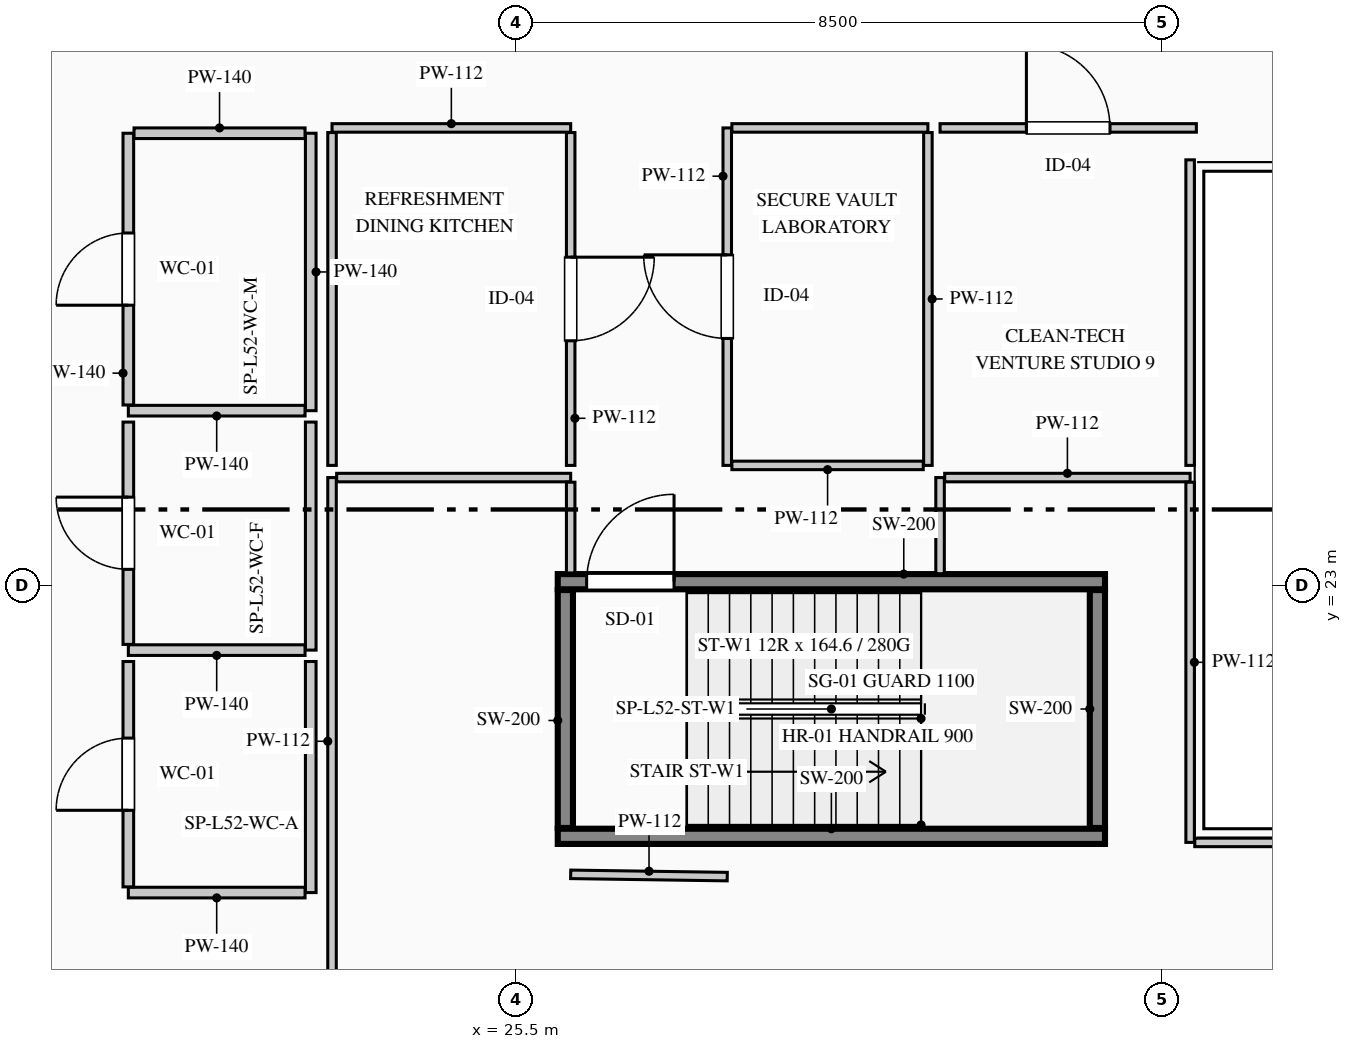
"""IFC4 building model, lengths in metres.
Left out: names, types, materials, properties, quantities, classifications, styles, units other than length and angle.
Written with IfcOpenShell. Run it as: python <this file> out.ifc"""

import sys

from ifc_helpers import new_model, si_unit, direction, frame, frame_2d, origin, place, context, subcontext, project, spatial, rectangle, extrude, element, fill, save


model = new_model("IFC4")
c1 = context("Model", 3, precision=1e-05, world=origin(), true_north=direction((0.0, 1.0)))
c2 = subcontext(c1, "Body", "Model", "MODEL_VIEW")
j1 = project(units=[si_unit("LENGTHUNIT", "METRE"), si_unit("PLANEANGLEUNIT", "RADIAN")], contexts=[c1])
p1 = place(None, origin())
s1 = spatial("IfcSite", under=j1, at=p1, CompositionType="ELEMENT")
p2 = place(p1, origin())
s2 = spatial("IfcBuilding", under=s1, at=p2, CompositionType="ELEMENT")
p3 = place(p2, frame((0.0, 0.0, 219.3)))
s3 = spatial("IfcBuildingStorey", under=s2, at=p3, CompositionType="ELEMENT", Elevation=219.3)
p4 = place(p3, frame((26.05, 19.7, 0.0), z_axis=(0.0, 0.0, 1.0), x_axis=(1.0, 0.0, 0.0)))
e1 = element("IfcWall", 1, at=p4, inside=s3, PredefinedType="SHEAR", context=c2, shape_type="SweptSolid", body=[
    extrude(rectangle(XDim=7.2, YDim=0.2, at=frame_2d((3.6, 0.0))), origin(), (0.0, 0.0, 1.0), 3.95),
])
p5 = place(p3, frame((26.05, 23.05, 0.0), z_axis=(0.0, 0.0, 1.0), x_axis=(1.0, 0.0, 0.0)))
e2 = element("IfcWall", 2, at=p5, inside=s3, PredefinedType="SHEAR", context=c2, shape_type="SweptSolid", body=[
    extrude(rectangle(XDim=7.2, YDim=0.2, at=frame_2d((3.6, 0.0))), origin(), (0.0, 0.0, 1.0), 3.95),
])
p6 = place(p5, frame((0.38, 0.0, 0.0)))
e3 = element("IfcOpeningElement", 3, at=p6, cuts=e2, PredefinedType="OPENING", context=c2, shape_type="SweptSolid", body=[
    extrude(rectangle(XDim=1.15, YDim=2.2, at=frame_2d((0.575, 1.1))), frame((0.0, 0.11, 0.0), z_axis=(0.0, -1.0, 0.0), x_axis=(1.0, 0.0, 0.0)), (0.0, 0.0, 1.0), 0.22),
])
for number, where, z_axis, x_axis in (
    (4, (26.15, 19.81, 0.0), (0.0, 0.0, 1.0), (0.0, 1.0, 0.0)),
    (5, (33.15, 19.81, 0.0), (0.0, 0.0, 1.0), (0.0, 1.0, 0.0)),
):
    element("IfcWall", number, at=place(p3, frame(where, z_axis=z_axis, x_axis=x_axis)), inside=s3, PredefinedType="SHEAR", context=c2, shape_type="SweptSolid", body=[
        extrude(rectangle(XDim=3.13, YDim=0.2, at=frame_2d((1.565, 0.0))), origin(), (0.0, 0.0, 1.0), 3.95),
    ])
p7 = place(p3, frame((22.8, 28.95, 0.0), z_axis=(0.0, 0.0, 1.0), x_axis=(0.0, -1.0, 0.0)))
e6 = element("IfcWall", 6, at=p7, inside=s3, PredefinedType="PARTITIONING", context=c2, shape_type="SweptSolid", body=[
    extrude(rectangle(XDim=3.65, YDim=0.14, at=frame_2d((1.825, 0.0))), origin(), (0.0, 0.0, 1.0), 3.385),
])
p8 = place(p3, frame((22.725, 25.3, 0.0), z_axis=(0.0, 0.0, 1.0), x_axis=(-1.0, 0.0, 0.0)))
e7 = element("IfcWall", 7, at=p8, inside=s3, PredefinedType="PARTITIONING", context=c2, shape_type="SweptSolid", body=[
    extrude(rectangle(XDim=2.325, YDim=0.14, at=frame_2d((1.163, 0.0))), origin(), (0.0, 0.0, 1.0), 3.7),
])
p9 = place(p3, frame((20.4, 25.375, 0.0), z_axis=(0.0, 0.0, 1.0), x_axis=(0.0, 1.0, 0.0)))
e8 = element("IfcWall", 8, at=p9, inside=s3, PredefinedType="PARTITIONING", context=c2, shape_type="SweptSolid", body=[
    extrude(rectangle(XDim=3.575, YDim=0.14, at=frame_2d((1.788, 0.0))), origin(), (0.0, 0.0, 1.0), 3.7),
])
p10 = place(p9, frame((1.312, 0.0, 0.0)))
e9 = element("IfcOpeningElement", 9, at=p10, cuts=e8, PredefinedType="OPENING", context=c2, shape_type="SweptSolid", body=[
    extrude(rectangle(XDim=0.95, YDim=2.15, at=frame_2d((0.475, 1.075))), frame((0.0, 0.08, 0.0), z_axis=(0.0, -1.0, 0.0), x_axis=(1.0, 0.0, 0.0)), (0.0, 0.0, 1.0), 0.16),
])
p11 = place(p3, frame((20.475, 28.95, 0.0), z_axis=(0.0, 0.0, 1.0), x_axis=(1.0, 0.0, 0.0)))
e10 = element("IfcWall", 10, at=p11, inside=s3, PredefinedType="PARTITIONING", context=c2, shape_type="SweptSolid", body=[
    extrude(rectangle(XDim=2.25, YDim=0.14, at=frame_2d((1.125, 0.0))), origin(), (0.0, 0.0, 1.0), 3.7),
])
p12 = place(p3, frame((22.8, 25.15, 0.0), z_axis=(0.0, 0.0, 1.0), x_axis=(0.0, -1.0, 0.0)))
e11 = element("IfcWall", 11, at=p12, inside=s3, PredefinedType="PARTITIONING", context=c2, shape_type="SweptSolid", body=[
    extrude(rectangle(XDim=3.0, YDim=0.14, at=frame_2d((1.5, 0.0))), origin(), (0.0, 0.0, 1.0), 3.385),
])
p13 = place(p3, frame((22.725, 22.15, 0.0), z_axis=(0.0, 0.0, 1.0), x_axis=(-1.0, 0.0, 0.0)))
e12 = element("IfcWall", 12, at=p13, inside=s3, PredefinedType="PARTITIONING", context=c2, shape_type="SweptSolid", body=[
    extrude(rectangle(XDim=2.325, YDim=0.14, at=frame_2d((1.163, 0.0))), origin(), (0.0, 0.0, 1.0), 3.7),
])
p14 = place(p3, frame((20.4, 22.225, 0.0), z_axis=(0.0, 0.0, 1.0), x_axis=(0.0, 1.0, 0.0)))
e13 = element("IfcWall", 13, at=p14, inside=s3, PredefinedType="PARTITIONING", context=c2, shape_type="SweptSolid", body=[
    extrude(rectangle(XDim=2.925, YDim=0.14, at=frame_2d((1.462, 0.0))), origin(), (0.0, 0.0, 1.0), 3.7),
])
p15 = place(p14, frame((0.988, 0.0, 0.0)))
e14 = element("IfcOpeningElement", 14, at=p15, cuts=e13, PredefinedType="OPENING", context=c2, shape_type="SweptSolid", body=[
    extrude(rectangle(XDim=0.95, YDim=2.15, at=frame_2d((0.475, 1.075))), frame((0.0, 0.08, 0.0), z_axis=(0.0, -1.0, 0.0), x_axis=(1.0, 0.0, 0.0)), (0.0, 0.0, 1.0), 0.16),
])
p16 = place(p3, frame((22.8, 22.0, 0.0), z_axis=(0.0, 0.0, 1.0), x_axis=(0.0, -1.0, 0.0)))
e15 = element("IfcWall", 15, at=p16, inside=s3, PredefinedType="PARTITIONING", context=c2, shape_type="SweptSolid", body=[
    extrude(rectangle(XDim=3.04, YDim=0.14, at=frame_2d((1.52, 0.0))), origin(), (0.0, 0.0, 1.0), 3.385),
])
p17 = place(p3, frame((22.725, 18.96, 0.0), z_axis=(0.0, 0.0, 1.0), x_axis=(-1.0, 0.0, 0.0)))
e16 = element("IfcWall", 16, at=p17, inside=s3, PredefinedType="PARTITIONING", context=c2, shape_type="SweptSolid", body=[
    extrude(rectangle(XDim=2.325, YDim=0.14, at=frame_2d((1.163, 0.0))), origin(), (0.0, 0.0, 1.0), 3.7),
])
p18 = place(p3, frame((20.4, 19.035, 0.0), z_axis=(0.0, 0.0, 1.0), x_axis=(0.0, 1.0, 0.0)))
e17 = element("IfcWall", 17, at=p18, inside=s3, PredefinedType="PARTITIONING", context=c2, shape_type="SweptSolid", body=[
    extrude(rectangle(XDim=2.965, YDim=0.14, at=frame_2d((1.482, 0.0))), origin(), (0.0, 0.0, 1.0), 3.7),
])
p19 = place(p18, frame((1.008, 0.0, 0.0)))
e18 = element("IfcOpeningElement", 18, at=p19, cuts=e17, PredefinedType="OPENING", context=c2, shape_type="SweptSolid", body=[
    extrude(rectangle(XDim=0.95, YDim=2.15, at=frame_2d((0.475, 1.075))), frame((0.0, 0.08, 0.0), z_axis=(0.0, -1.0, 0.0), x_axis=(1.0, 0.0, 0.0)), (0.0, 0.0, 1.0), 0.16),
])
p20 = place(p3, frame((31.08, 23.155, 0.0), z_axis=(0.0, 0.0, 1.0), x_axis=(0.0, 1.0, 0.0)))
e19 = element("IfcWall", 19, at=p20, inside=s3, PredefinedType="PARTITIONING", context=c2, shape_type="SweptSolid", body=[
    extrude(rectangle(XDim=1.265, YDim=0.112, at=frame_2d((0.632, 0.0))), origin(), (0.0, 0.0, 1.0), 3.7),
])
p21 = place(p3, frame((31.141, 24.42, 0.0), z_axis=(0.0, 0.0, 1.0), x_axis=(1.0, 0.0, 0.0)))
e20 = element("IfcWall", 20, at=p21, inside=s3, PredefinedType="PARTITIONING", context=c2, shape_type="SweptSolid", body=[
    extrude(rectangle(XDim=3.229, YDim=0.112, at=frame_2d((1.615, 0.0))), origin(), (0.0, 0.0, 1.0), 3.385),
])
p22 = place(p3, frame((34.37, 24.359, 0.0), z_axis=(0.0, 0.0, 1.0), x_axis=(0.0, -1.0, 0.0)))
e21 = element("IfcWall", 21, at=p22, inside=s3, PredefinedType="PARTITIONING", context=c2, shape_type="SweptSolid", body=[
    extrude(rectangle(XDim=4.739, YDim=0.112, at=frame_2d((2.369, 0.0))), origin(), (0.0, 0.0, 1.0), 3.7),
])
p23 = place(p3, frame((34.431, 19.62, 0.0), z_axis=(0.0, 0.0, 1.0), x_axis=(1.0, 0.0, 0.0)))
e22 = element("IfcWall", 22, at=p23, inside=s3, PredefinedType="PARTITIONING", context=c2, shape_type="SweptSolid", body=[
    extrude(rectangle(XDim=4.989, YDim=0.112, at=frame_2d((2.495, 0.0))), origin(), (0.0, 0.0, 1.0), 3.7),
])
p24 = place(p3, frame((23.08, 17.481, 0.0), z_axis=(0.0, 0.0, 1.0), x_axis=(0.0, 1.0, 0.0)))
e23 = element("IfcWall", 23, at=p24, inside=s3, PredefinedType="PARTITIONING", context=c2, shape_type="SweptSolid", body=[
    extrude(rectangle(XDim=6.939, YDim=0.112, at=frame_2d((3.469, 0.0))), origin(), (0.0, 0.0, 1.0), 3.385),
])
p25 = place(p3, frame((23.141, 24.42, 0.0), z_axis=(0.0, 0.0, 1.0), x_axis=(1.0, 0.0, 0.0)))
e24 = element("IfcWall", 24, at=p25, inside=s3, PredefinedType="PARTITIONING", context=c2, shape_type="SweptSolid", body=[
    extrude(rectangle(XDim=3.079, YDim=0.112, at=frame_2d((1.54, 0.0))), origin(), (0.0, 0.0, 1.0), 3.385),
])
p26 = place(p3, frame((26.22, 24.359, 0.0), z_axis=(0.0, 0.0, 1.0), x_axis=(0.0, -1.0, 0.0)))
e25 = element("IfcWall", 25, at=p26, inside=s3, PredefinedType="PARTITIONING", context=c2, shape_type="SweptSolid", body=[
    extrude(rectangle(XDim=1.194, YDim=0.112, at=frame_2d((0.597, 0.0))), origin(), (0.0, 0.0, 1.0), 3.7),
])
p27 = place(p3, frame((26.22, 19.2, 0.0), z_axis=(0.0, 0.0, 1.0), x_axis=(0.999893773718, -0.014575365509, 0.0)))
e26 = element("IfcWall", 26, at=p27, inside=s3, PredefinedType="PARTITIONING", context=c2, shape_type="SweptSolid", body=[
    extrude(rectangle(XDim=2.06, YDim=0.112, at=frame_2d((1.03, 0.0))), origin(), (0.0, 0.0, 1.0), 3.385),
])
p28 = place(p3, frame((23.08, 29.02, 0.0), z_axis=(0.0, 0.0, 1.0), x_axis=(1.0, 0.0, 0.0)))
e27 = element("IfcWall", 27, at=p28, inside=s3, PredefinedType="PARTITIONING", context=c2, shape_type="SweptSolid", body=[
    extrude(rectangle(XDim=3.14, YDim=0.112, at=frame_2d((1.57, 0.0))), origin(), (0.0, 0.0, 1.0), 3.385),
])
p29 = place(p3, frame((26.22, 28.959, 0.0), z_axis=(0.0, 0.0, 1.0), x_axis=(0.0, -1.0, 0.0)))
e28 = element("IfcWall", 28, at=p29, inside=s3, PredefinedType="PARTITIONING", context=c2, shape_type="SweptSolid", body=[
    extrude(rectangle(XDim=4.379, YDim=0.112, at=frame_2d((2.189, 0.0))), origin(), (0.0, 0.0, 1.0), 3.7),
])
p30 = place(p29, frame((1.639, 0.0, 0.0)))
e29 = element("IfcOpeningElement", 29, at=p30, cuts=e28, PredefinedType="OPENING", context=c2, shape_type="SweptSolid", body=[
    extrude(rectangle(XDim=1.1, YDim=2.2, at=frame_2d((0.55, 1.1))), frame((0.0, 0.066, 0.0), z_axis=(0.0, -1.0, 0.0), x_axis=(1.0, 0.0, 0.0)), (0.0, 0.0, 1.0), 0.132),
])
p31 = place(p3, frame((23.08, 24.58, 0.0), z_axis=(0.0, 0.0, 1.0), x_axis=(0.0, 1.0, 0.0)))
e30 = element("IfcWall", 30, at=p31, inside=s3, PredefinedType="PARTITIONING", context=c2, shape_type="SweptSolid", body=[
    extrude(rectangle(XDim=4.379, YDim=0.112, at=frame_2d((2.189, 0.0))), origin(), (0.0, 0.0, 1.0), 3.385),
])
p32 = place(p3, frame((28.28, 24.58, 0.0), z_axis=(0.0, 0.0, 1.0), x_axis=(0.0, 1.0, 0.0)))
e31 = element("IfcWall", 31, at=p32, inside=s3, PredefinedType="PARTITIONING", context=c2, shape_type="SweptSolid", body=[
    extrude(rectangle(XDim=4.44, YDim=0.112, at=frame_2d((2.22, 0.0))), origin(), (0.0, 0.0, 1.0), 3.7),
])
p33 = place(p32, frame((1.67, 0.0, 0.0)))
e32 = element("IfcOpeningElement", 32, at=p33, cuts=e31, PredefinedType="OPENING", context=c2, shape_type="SweptSolid", body=[
    extrude(rectangle(XDim=1.1, YDim=2.2, at=frame_2d((0.55, 1.1))), frame((0.0, 0.066, 0.0), z_axis=(0.0, -1.0, 0.0), x_axis=(1.0, 0.0, 0.0)), (0.0, 0.0, 1.0), 0.132),
])
p34 = place(p3, frame((28.341, 29.02, 0.0), z_axis=(0.0, 0.0, 1.0), x_axis=(1.0, 0.0, 0.0)))
e33 = element("IfcWall", 33, at=p34, inside=s3, PredefinedType="PARTITIONING", context=c2, shape_type="SweptSolid", body=[
    extrude(rectangle(XDim=2.579, YDim=0.112, at=frame_2d((1.29, 0.0))), origin(), (0.0, 0.0, 1.0), 3.385),
])
p35 = place(p3, frame((30.92, 28.959, 0.0), z_axis=(0.0, 0.0, 1.0), x_axis=(0.0, -1.0, 0.0)))
e34 = element("IfcWall", 34, at=p35, inside=s3, PredefinedType="PARTITIONING", context=c2, shape_type="SweptSolid", body=[
    extrude(rectangle(XDim=4.379, YDim=0.112, at=frame_2d((2.189, 0.0))), origin(), (0.0, 0.0, 1.0), 3.7),
])
p36 = place(p3, frame((30.859, 24.58, 0.0), z_axis=(0.0, 0.0, 1.0), x_axis=(-1.0, 0.0, 0.0)))
e35 = element("IfcWall", 35, at=p36, inside=s3, PredefinedType="PARTITIONING", context=c2, shape_type="SweptSolid", body=[
    extrude(rectangle(XDim=2.518, YDim=0.112, at=frame_2d((1.259, 0.0))), origin(), (0.0, 0.0, 1.0), 3.485),
])
p37 = place(p3, frame((34.37, 28.6, 0.0), z_axis=(0.0, 0.0, 1.0), x_axis=(0.0, -1.0, 0.0)))
e36 = element("IfcWall", 36, at=p37, inside=s3, PredefinedType="PARTITIONING", context=c2, shape_type="SweptSolid", body=[
    extrude(rectangle(XDim=4.02, YDim=0.112, at=frame_2d((2.01, 0.0))), origin(), (0.0, 0.0, 1.0), 3.7),
])
p38 = place(p3, frame((31.08, 29.02, 0.0), z_axis=(0.0, 0.0, 1.0), x_axis=(1.0, 0.0, 0.0)))
e37 = element("IfcWall", 37, at=p38, inside=s3, PredefinedType="PARTITIONING", context=c2, shape_type="SweptSolid", body=[
    extrude(rectangle(XDim=3.372, YDim=0.112, at=frame_2d((1.686, 0.0))), origin(), (0.0, 0.0, 1.0), 3.385),
])
p39 = place(p38, frame((1.136, 0.0, 0.0)))
e38 = element("IfcOpeningElement", 38, at=p39, cuts=e37, PredefinedType="OPENING", context=c2, shape_type="SweptSolid", body=[
    extrude(rectangle(XDim=1.1, YDim=2.2, at=frame_2d((0.55, 1.1))), frame((0.0, 0.066, 0.0), z_axis=(0.0, -1.0, 0.0), x_axis=(1.0, 0.0, 0.0)), (0.0, 0.0, 1.0), 0.132),
])
p40 = place(p6, origin())
e39 = element("IfcDoor", 39, at=p40, inside=s3, OperationType="SINGLE_SWING_RIGHT", PredefinedType="DOOR", context=c2, shape_type="SweptSolid", body=[
    extrude(rectangle(XDim=1.15, YDim=2.2, at=frame_2d((0.575, 1.1))), frame((0.0, 0.025, 0.0), z_axis=(0.0, -1.0, 0.0), x_axis=(1.0, 0.0, 0.0)), (0.0, 0.0, 1.0), 0.05),
])
fill(e3, e39)
p41 = place(p10, origin())
e40 = element("IfcDoor", 40, at=p41, inside=s3, OperationType="SINGLE_SWING_LEFT", PredefinedType="DOOR", context=c2, shape_type="SweptSolid", body=[
    extrude(rectangle(XDim=0.95, YDim=2.15, at=frame_2d((0.475, 1.075))), frame((0.0, 0.025, 0.0), z_axis=(0.0, -1.0, 0.0), x_axis=(1.0, 0.0, 0.0)), (0.0, 0.0, 1.0), 0.05),
])
fill(e9, e40)
p42 = place(p15, origin())
e41 = element("IfcDoor", 41, at=p42, inside=s3, OperationType="SINGLE_SWING_RIGHT", PredefinedType="DOOR", context=c2, shape_type="SweptSolid", body=[
    extrude(rectangle(XDim=0.95, YDim=2.15, at=frame_2d((0.475, 1.075))), frame((0.0, 0.025, 0.0), z_axis=(0.0, -1.0, 0.0), x_axis=(1.0, 0.0, 0.0)), (0.0, 0.0, 1.0), 0.05),
])
fill(e14, e41)
p43 = place(p19, origin())
e42 = element("IfcDoor", 42, at=p43, inside=s3, OperationType="SINGLE_SWING_LEFT", PredefinedType="DOOR", context=c2, shape_type="SweptSolid", body=[
    extrude(rectangle(XDim=0.95, YDim=2.15, at=frame_2d((0.475, 1.075))), frame((0.0, 0.025, 0.0), z_axis=(0.0, -1.0, 0.0), x_axis=(1.0, 0.0, 0.0)), (0.0, 0.0, 1.0), 0.05),
])
fill(e18, e42)
p44 = place(p30, origin())
e43 = element("IfcDoor", 43, at=p44, inside=s3, OperationType="SINGLE_SWING_LEFT", PredefinedType="DOOR", context=c2, shape_type="SweptSolid", body=[
    extrude(rectangle(XDim=1.1, YDim=2.2, at=frame_2d((0.55, 1.1))), frame((0.0, 0.025, 0.0), z_axis=(0.0, -1.0, 0.0), x_axis=(1.0, 0.0, 0.0)), (0.0, 0.0, 1.0), 0.05),
])
fill(e29, e43)
p45 = place(p33, origin())
e44 = element("IfcDoor", 44, at=p45, inside=s3, OperationType="SINGLE_SWING_RIGHT", PredefinedType="DOOR", context=c2, shape_type="SweptSolid", body=[
    extrude(rectangle(XDim=1.1, YDim=2.2, at=frame_2d((0.55, 1.1))), frame((0.0, 0.025, 0.0), z_axis=(0.0, -1.0, 0.0), x_axis=(1.0, 0.0, 0.0)), (0.0, 0.0, 1.0), 0.05),
])
fill(e32, e44)
p46 = place(p39, origin())
e45 = element("IfcDoor", 45, at=p46, inside=s3, OperationType="SINGLE_SWING_LEFT", PredefinedType="DOOR", context=c2, shape_type="SweptSolid", body=[
    extrude(rectangle(XDim=1.1, YDim=2.2, at=frame_2d((0.55, 1.1))), frame((0.0, 0.025, 0.0), z_axis=(0.0, -1.0, 0.0), x_axis=(1.0, 0.0, 0.0)), (0.0, 0.0, 1.0), 0.05),
])
fill(e38, e45)
save(model, sys.argv[1])
